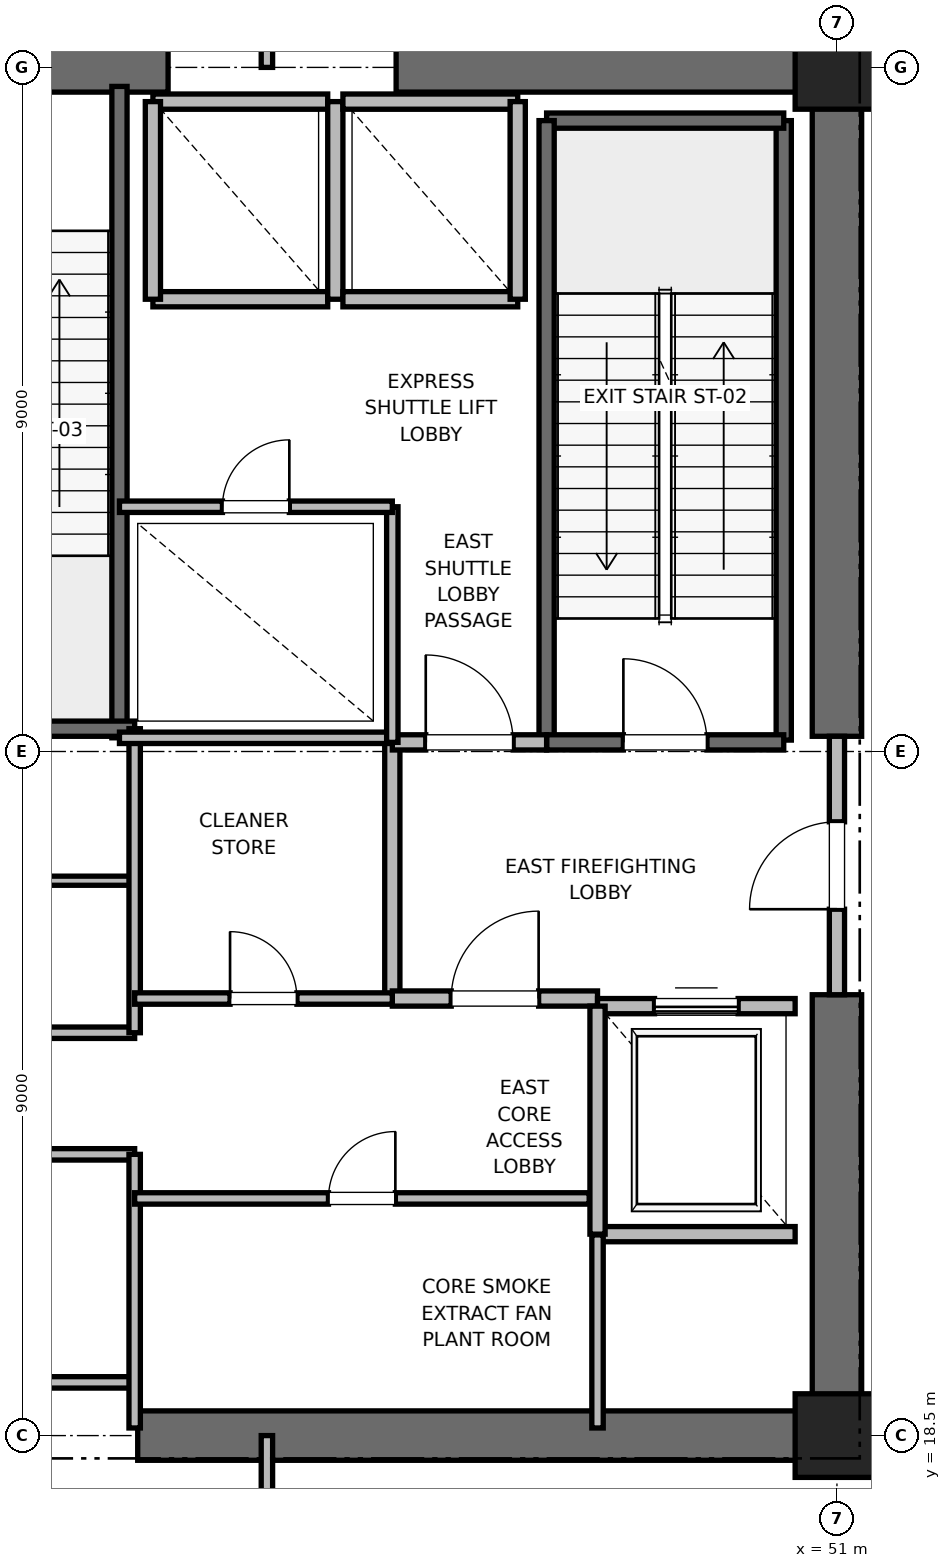
"""IFC4 building model, lengths in metres.
Left out: names, types, materials, properties, quantities, classifications, styles, units other than length and angle.
Written with IfcOpenShell. Run it as: python <this file> out.ifc"""

import sys

from ifc_helpers import new_model, si_unit, direction, frame, frame_2d, origin, origin_2d, place, context, subcontext, project, spatial, rectangle, extrude, element, fill, save


model = new_model("IFC4")
c1 = context("Model", 3, precision=1e-05, world=origin(), true_north=direction((0.0, 1.0)))
c2 = subcontext(c1, "Body", "Model", "MODEL_VIEW")
j1 = project(units=[si_unit("LENGTHUNIT", "METRE"), si_unit("PLANEANGLEUNIT", "RADIAN")], contexts=[c1])
p1 = place(None, origin())
s1 = spatial("IfcSite", under=j1, at=p1, CompositionType="ELEMENT")
p2 = place(p1, origin())
s2 = spatial("IfcBuilding", under=s1, at=p2, CompositionType="ELEMENT")
p3 = place(p2, frame((0.0, 0.0, 107.6)))
s3 = spatial("IfcBuildingStorey", under=s2, at=p3, CompositionType="ELEMENT", Elevation=107.6)
for number, where, z_axis, x_axis in (
    (1, (51.0, 18.5, 0.0), (0.0, 0.0, 1.0), (1.0, 0.0, 0.0)),
    (2, (51.0, 36.5, 0.0), (0.0, 0.0, 1.0), (1.0, 0.0, 0.0)),
):
    element("IfcColumn", number, at=place(p3, frame(where, z_axis=z_axis, x_axis=x_axis)), inside=s3, PredefinedType="PILASTER", context=c2, shape_type="SweptSolid", body=[
        extrude(rectangle(XDim=1.1, YDim=1.1, at=origin_2d()), origin(), (0.0, 0.0, 1.0), 5.4),
    ])
p4 = place(p3, frame((41.8, 18.5, 0.0), z_axis=(0.0, 0.0, 1.0), x_axis=(1.0, 0.0, 0.0)))
e3 = element("IfcWall", 3, at=p4, inside=s3, PredefinedType="SHEAR", context=c2, shape_type="SweptSolid", body=[
    extrude(rectangle(XDim=9.2, YDim=0.65, at=frame_2d((4.6, 0.0))), origin(), (0.0, 0.0, 1.0), 5.1),
])
p5 = place(p3, frame((37.8, 36.5, 0.0), z_axis=(0.0, 0.0, 1.0), x_axis=(1.0, 0.0, 0.0)))
e4 = element("IfcWall", 4, at=p5, inside=s3, PredefinedType="SHEAR", context=c2, shape_type="SweptSolid", body=[
    extrude(rectangle(XDim=4.4, YDim=0.65, at=frame_2d((2.2, 0.0))), origin(), (0.0, 0.0, 1.0), 5.1),
])
p6 = place(p5, frame((1.65, 0.0, 0.0)))
e5 = element("IfcOpeningElement", 5, at=p6, cuts=e4, PredefinedType="OPENING", context=c2, shape_type="SweptSolid", body=[
    extrude(rectangle(XDim=1.1, YDim=2.15, at=frame_2d((0.55, 1.075))), frame((0.0, 0.325, 0.0), z_axis=(0.0, -1.0, 0.0), x_axis=(1.0, 0.0, 0.0)), (0.0, 0.0, 1.0), 0.65),
])
for number, where, z_axis, x_axis in (
    (6, (45.2, 36.5, 0.0), (0.0, 0.0, 1.0), (1.0, 0.0, 0.0)),
    (7, (51.0, 18.5, 0.0), (0.0, 0.0, 1.0), (0.0, 1.0, 0.0)),
):
    element("IfcWall", number, at=place(p3, frame(where, z_axis=z_axis, x_axis=x_axis)), inside=s3, PredefinedType="SHEAR", context=c2, shape_type="SweptSolid", body=[
        extrude(rectangle(XDim=5.8, YDim=0.65, at=frame_2d((2.9, 0.0))), origin(), (0.0, 0.0, 1.0), 5.1),
    ])
p7 = place(p3, frame((51.0, 27.7, 0.0), z_axis=(0.0, 0.0, 1.0), x_axis=(0.0, 1.0, 0.0)))
e8 = element("IfcWall", 8, at=p7, inside=s3, PredefinedType="SHEAR", context=c2, shape_type="SweptSolid", body=[
    extrude(rectangle(XDim=8.8, YDim=0.65, at=frame_2d((4.4, 0.0))), origin(), (0.0, 0.0, 1.0), 5.1),
])
p8 = place(p3, frame((50.3, 27.65, 0.0), z_axis=(0.0, 0.0, 1.0), x_axis=(0.0, 1.0, 0.0)))
e9 = element("IfcWall", 9, at=p8, inside=s3, PredefinedType="SOLIDWALL", context=c2, shape_type="SweptSolid", body=[
    extrude(rectangle(XDim=8.15, YDim=0.2, at=frame_2d((4.075, 0.0))), origin(), (0.0, 0.0, 1.0), 5.1),
])
p9 = place(p3, frame((47.18, 35.8, 0.0), z_axis=(0.0, 0.0, 1.0), x_axis=(1.0, 0.0, 0.0)))
e10 = element("IfcWall", 10, at=p9, inside=s3, PredefinedType="SOLIDWALL", context=c2, shape_type="SweptSolid", body=[
    extrude(rectangle(XDim=3.12, YDim=0.2, at=frame_2d((1.56, 0.0))), origin(), (0.0, 0.0, 1.0), 5.1),
])
p10 = place(p3, frame((47.18, 27.62, 0.0), z_axis=(0.0, 0.0, 1.0), x_axis=(0.0, 1.0, 0.0)))
e11 = element("IfcWall", 11, at=p10, inside=s3, PredefinedType="SOLIDWALL", context=c2, shape_type="SweptSolid", body=[
    extrude(rectangle(XDim=8.18, YDim=0.2, at=frame_2d((4.09, 0.0))), origin(), (0.0, 0.0, 1.0), 5.1),
])
p11 = place(p3, frame((47.18, 27.62, 0.0), z_axis=(0.0, 0.0, 1.0), x_axis=(1.0, 0.0, 0.0)))
e12 = element("IfcWall", 12, at=p11, inside=s3, PredefinedType="SOLIDWALL", context=c2, shape_type="SweptSolid", body=[
    extrude(rectangle(XDim=3.12, YDim=0.2, at=frame_2d((1.56, 0.0))), origin(), (0.0, 0.0, 1.0), 5.1),
])
p12 = place(p11, frame((1.01, 0.0, 0.0)))
e13 = element("IfcOpeningElement", 13, at=p12, cuts=e12, PredefinedType="OPENING", context=c2, shape_type="SweptSolid", body=[
    extrude(rectangle(XDim=1.1, YDim=2.15, at=frame_2d((0.55, 1.075))), frame((0.0, 0.1, 0.0), z_axis=(0.0, -1.0, 0.0), x_axis=(1.0, 0.0, 0.0)), (0.0, 0.0, 1.0), 0.2),
])
p13 = place(p3, frame((41.56, 27.68, 0.0), z_axis=(0.0, 0.0, 1.0), x_axis=(0.0, 1.0, 0.0)))
e14 = element("IfcWall", 14, at=p13, inside=s3, PredefinedType="SOLIDWALL", context=c2, shape_type="SweptSolid", body=[
    extrude(rectangle(XDim=8.57, YDim=0.2, at=frame_2d((4.285, 0.0))), origin(), (0.0, 0.0, 1.0), 5.1),
])
p14 = place(p3, frame((38.44, 27.8, 0.0), z_axis=(0.0, 0.0, 1.0), x_axis=(1.0, 0.0, 0.0)))
e15 = element("IfcWall", 15, at=p14, inside=s3, PredefinedType="SOLIDWALL", context=c2, shape_type="SweptSolid", body=[
    extrude(rectangle(XDim=3.32, YDim=0.2, at=frame_2d((1.66, 0.0))), origin(), (0.0, 0.0, 1.0), 5.1),
])
p15 = place(p3, frame((45.15, 24.25, 0.0), z_axis=(0.0, 0.0, 1.0), x_axis=(0.0, 1.0, 0.0)))
e16 = element("IfcWall", 16, at=p15, inside=s3, PredefinedType="PARTITIONING", context=c2, shape_type="SweptSolid", body=[
    extrude(rectangle(XDim=3.37, YDim=0.2, at=frame_2d((1.685, 0.0))), origin(), (0.0, 0.0, 1.0), 5.1),
])
p16 = place(p3, frame((45.15, 24.25, 0.0), z_axis=(0.0, 0.0, 1.0), x_axis=(1.0, 0.0, 0.0)))
e17 = element("IfcWall", 17, at=p16, inside=s3, PredefinedType="PARTITIONING", context=c2, shape_type="SweptSolid", body=[
    extrude(rectangle(XDim=2.7, YDim=0.2, at=frame_2d((1.35, 0.0))), origin(), (0.0, 0.0, 1.0), 5.1),
])
p17 = place(p16, frame((0.775, 0.0, 0.0)))
e18 = element("IfcOpeningElement", 18, at=p17, cuts=e17, PredefinedType="OPENING", context=c2, shape_type="SweptSolid", body=[
    extrude(rectangle(XDim=1.15, YDim=2.2, at=frame_2d((0.575, 1.1))), frame((0.0, 0.1, 0.0), z_axis=(0.0, -1.0, 0.0), x_axis=(1.0, 0.0, 0.0)), (0.0, 0.0, 1.0), 0.2),
])
p18 = place(p3, frame((45.15, 27.62, 0.0), z_axis=(0.0, 0.0, 1.0), x_axis=(1.0, 0.0, 0.0)))
e19 = element("IfcWall", 19, at=p18, inside=s3, PredefinedType="PARTITIONING", context=c2, shape_type="SweptSolid", body=[
    extrude(rectangle(XDim=2.03, YDim=0.2, at=frame_2d((1.015, 0.0))), origin(), (0.0, 0.0, 1.0), 5.1),
])
p19 = place(p18, frame((0.44, 0.0, 0.0)))
e20 = element("IfcOpeningElement", 20, at=p19, cuts=e19, PredefinedType="OPENING", context=c2, shape_type="SweptSolid", body=[
    extrude(rectangle(XDim=1.15, YDim=2.2, at=frame_2d((0.575, 1.1))), frame((0.0, 0.1, 0.0), z_axis=(0.0, -1.0, 0.0), x_axis=(1.0, 0.0, 0.0)), (0.0, 0.0, 1.0), 0.2),
])
p20 = place(p3, frame((51.0, 24.3, 0.0), z_axis=(0.0, 0.0, 1.0), x_axis=(0.0, 1.0, 0.0)))
e21 = element("IfcWall", 21, at=p20, inside=s3, PredefinedType="PARTITIONING", context=c2, shape_type="SweptSolid", body=[
    extrude(rectangle(XDim=3.4, YDim=0.2, at=frame_2d((1.7, 0.0))), origin(), (0.0, 0.0, 1.0), 3.88),
])
p21 = place(p20, frame((1.125, 0.0, 0.0)))
e22 = element("IfcOpeningElement", 22, at=p21, cuts=e21, PredefinedType="OPENING", context=c2, shape_type="SweptSolid", body=[
    extrude(rectangle(XDim=1.15, YDim=2.2, at=frame_2d((0.575, 1.1))), frame((0.0, 0.1, 0.0), z_axis=(0.0, -1.0, 0.0), x_axis=(1.0, 0.0, 0.0)), (0.0, 0.0, 1.0), 0.2),
])
p22 = place(p3, frame((47.85, 21.15, 0.0), z_axis=(0.0, 0.0, 1.0), x_axis=(1.0, 0.0, 0.0)))
e23 = element("IfcWall", 23, at=p22, inside=s3, PredefinedType="SOLIDWALL", context=c2, shape_type="SweptSolid", body=[
    extrude(rectangle(XDim=2.6, YDim=0.2, at=frame_2d((1.3, 0.0))), origin(), (0.0, 0.0, 1.0), 5.1),
])
p23 = place(p3, frame((50.45, 24.15, 0.0), z_axis=(0.0, 0.0, 1.0), x_axis=(-1.0, 0.0, 0.0)))
e24 = element("IfcWall", 24, at=p23, inside=s3, PredefinedType="SOLIDWALL", context=c2, shape_type="SweptSolid", body=[
    extrude(rectangle(XDim=2.6, YDim=0.2, at=frame_2d((1.3, 0.0))), origin(), (0.0, 0.0, 1.0), 3.88),
])
p24 = place(p23, frame((0.75, 0.0, 0.0)))
e25 = element("IfcOpeningElement", 25, at=p24, cuts=e24, PredefinedType="OPENING", context=c2, shape_type="SweptSolid", body=[
    extrude(rectangle(XDim=1.1, YDim=2.2, at=frame_2d((0.55, 1.1))), frame((0.0, 0.1, 0.0), z_axis=(0.0, -1.0, 0.0), x_axis=(1.0, 0.0, 0.0)), (0.0, 0.0, 1.0), 0.2),
])
p25 = place(p3, frame((47.85, 24.15, 0.0), z_axis=(0.0, 0.0, 1.0), x_axis=(0.0, -1.0, 0.0)))
e26 = element("IfcWall", 26, at=p25, inside=s3, PredefinedType="SOLIDWALL", context=c2, shape_type="SweptSolid", body=[
    extrude(rectangle(XDim=3.0, YDim=0.2, at=frame_2d((1.5, 0.0))), origin(), (0.0, 0.0, 1.0), 5.1),
])
p26 = place(p3, frame((42.0, 33.45, 0.0), z_axis=(0.0, 0.0, 1.0), x_axis=(1.0, 0.0, 0.0)))
e27 = element("IfcWall", 27, at=p26, inside=s3, PredefinedType="SOLIDWALL", context=c2, shape_type="SweptSolid", body=[
    extrude(rectangle(XDim=2.3, YDim=0.2, at=frame_2d((1.15, 0.0))), origin(), (0.0, 0.0, 1.0), 5.1),
])
p27 = place(p3, frame((44.3, 36.05, 0.0), z_axis=(0.0, 0.0, 1.0), x_axis=(-1.0, 0.0, 0.0)))
e28 = element("IfcWall", 28, at=p27, inside=s3, PredefinedType="SOLIDWALL", context=c2, shape_type="SweptSolid", body=[
    extrude(rectangle(XDim=2.3, YDim=0.2, at=frame_2d((1.15, 0.0))), origin(), (0.0, 0.0, 1.0), 3.88),
])
for number, where, z_axis, x_axis in (
    (29, (42.0, 36.05, 0.0), (0.0, 0.0, 1.0), (0.0, -1.0, 0.0)),
    (30, (44.4, 33.45, 0.0), (0.0, 0.0, 1.0), (0.0, 1.0, 0.0)),
):
    element("IfcWall", number, at=place(p3, frame(where, z_axis=z_axis, x_axis=x_axis)), inside=s3, PredefinedType="SOLIDWALL", context=c2, shape_type="SweptSolid", body=[
        extrude(rectangle(XDim=2.6, YDim=0.2, at=frame_2d((1.3, 0.0))), origin(), (0.0, 0.0, 1.0), 3.88),
    ])
p28 = place(p3, frame((44.5, 33.45, 0.0), z_axis=(0.0, 0.0, 1.0), x_axis=(1.0, 0.0, 0.0)))
e31 = element("IfcWall", 31, at=p28, inside=s3, PredefinedType="SOLIDWALL", context=c2, shape_type="SweptSolid", body=[
    extrude(rectangle(XDim=2.3, YDim=0.2, at=frame_2d((1.15, 0.0))), origin(), (0.0, 0.0, 1.0), 5.1),
])
p29 = place(p3, frame((46.8, 36.05, 0.0), z_axis=(0.0, 0.0, 1.0), x_axis=(-1.0, 0.0, 0.0)))
e32 = element("IfcWall", 32, at=p29, inside=s3, PredefinedType="SOLIDWALL", context=c2, shape_type="SweptSolid", body=[
    extrude(rectangle(XDim=2.3, YDim=0.2, at=frame_2d((1.15, 0.0))), origin(), (0.0, 0.0, 1.0), 3.88),
])
p30 = place(p3, frame((46.8, 33.45, 0.0), z_axis=(0.0, 0.0, 1.0), x_axis=(0.0, 1.0, 0.0)))
e33 = element("IfcWall", 33, at=p30, inside=s3, PredefinedType="SOLIDWALL", context=c2, shape_type="SweptSolid", body=[
    extrude(rectangle(XDim=2.6, YDim=0.2, at=frame_2d((1.3, 0.0))), origin(), (0.0, 0.0, 1.0), 5.1),
])
for number, where, z_axis, x_axis in (
    (34, (39.95, 19.2, 0.0), (0.0, 0.0, 1.0), (1.0, 0.0, 0.0)),
    (35, (39.95, 22.2, 0.0), (0.0, 0.0, 1.0), (1.0, 0.0, 0.0)),
    (36, (39.95, 23.8, 0.0), (0.0, 0.0, 1.0), (1.0, 0.0, 0.0)),
):
    element("IfcWall", number, at=place(p3, frame(where, z_axis=z_axis, x_axis=x_axis)), inside=s3, PredefinedType="PARTITIONING", context=c2, shape_type="SweptSolid", body=[
        extrude(rectangle(XDim=1.81, YDim=0.15, at=frame_2d((0.905, 0.0))), origin(), (0.0, 0.0, 1.0), 2.85),
    ])
p31 = place(p3, frame((39.95, 25.8, 0.0), z_axis=(0.0, 0.0, 1.0), x_axis=(1.0, 0.0, 0.0)))
e37 = element("IfcWall", 37, at=p31, inside=s3, PredefinedType="PARTITIONING", context=c2, shape_type="SweptSolid", body=[
    extrude(rectangle(XDim=1.81, YDim=0.12, at=frame_2d((0.905, 0.0))), origin(), (0.0, 0.0, 1.0), 2.85),
])
p32 = place(p3, frame((41.76, 18.6, 0.0), z_axis=(0.0, 0.0, 1.0), x_axis=(0.0, 1.0, 0.0)))
e38 = element("IfcWall", 38, at=p32, inside=s3, PredefinedType="PARTITIONING", context=c2, shape_type="SweptSolid", body=[
    extrude(rectangle(XDim=3.6, YDim=0.15, at=frame_2d((1.8, 0.0))), origin(), (0.0, 0.0, 1.0), 2.85),
])
p33 = place(p3, frame((41.76, 23.8, 0.0), z_axis=(0.0, 0.0, 1.0), x_axis=(0.0, 1.0, 0.0)))
e39 = element("IfcWall", 39, at=p33, inside=s3, PredefinedType="PARTITIONING", context=c2, shape_type="SweptSolid", body=[
    extrude(rectangle(XDim=4.0, YDim=0.15, at=frame_2d((2.0, 0.0))), origin(), (0.0, 0.0, 1.0), 2.85),
])
p34 = place(p3, frame((41.56, 27.68, 0.0), z_axis=(0.0, 0.0, 1.0), x_axis=(1.0, 0.0, 0.0)))
e40 = element("IfcWall", 40, at=p34, inside=s3, PredefinedType="PARTITIONING", context=c2, shape_type="SweptSolid", body=[
    extrude(rectangle(XDim=3.59, YDim=0.15, at=frame_2d((1.795, 0.0))), origin(), (0.0, 0.0, 1.0), 2.85),
])
p35 = place(p3, frame((47.85, 18.6, 0.0), z_axis=(0.0, 0.0, 1.0), x_axis=(0.0, 1.0, 0.0)))
e41 = element("IfcWall", 41, at=p35, inside=s3, PredefinedType="PARTITIONING", context=c2, shape_type="SweptSolid", body=[
    extrude(rectangle(XDim=2.54, YDim=0.15, at=frame_2d((1.27, 0.0))), origin(), (0.0, 0.0, 1.0), 2.85),
])
p36 = place(p3, frame((41.76, 21.62, 0.0), z_axis=(0.0, 0.0, 1.0), x_axis=(1.0, 0.0, 0.0)))
e42 = element("IfcWall", 42, at=p36, inside=s3, PredefinedType="PARTITIONING", context=c2, shape_type="SweptSolid", body=[
    extrude(rectangle(XDim=5.98, YDim=0.15, at=frame_2d((2.99, 0.0))), origin(), (0.0, 0.0, 1.0), 2.85),
])
p37 = place(p36, frame((2.55, 0.0, 0.0)))
e43 = element("IfcOpeningElement", 43, at=p37, cuts=e42, PredefinedType="OPENING", context=c2, shape_type="SweptSolid", body=[
    extrude(rectangle(XDim=0.88, YDim=2.1, at=frame_2d((0.44, 1.05))), frame((0.0, 0.075, 0.0), z_axis=(0.0, -1.0, 0.0), x_axis=(1.0, 0.0, 0.0)), (0.0, 0.0, 1.0), 0.15),
])
p38 = place(p3, frame((41.76, 24.25, 0.0), z_axis=(0.0, 0.0, 1.0), x_axis=(1.0, 0.0, 0.0)))
e44 = element("IfcWall", 44, at=p38, inside=s3, PredefinedType="PARTITIONING", context=c2, shape_type="SweptSolid", body=[
    extrude(rectangle(XDim=3.39, YDim=0.15, at=frame_2d((1.695, 0.0))), origin(), (0.0, 0.0, 1.0), 2.85),
])
p39 = place(p38, frame((1.255, 0.0, 0.0)))
e45 = element("IfcOpeningElement", 45, at=p39, cuts=e44, PredefinedType="OPENING", context=c2, shape_type="SweptSolid", body=[
    extrude(rectangle(XDim=0.88, YDim=2.1, at=frame_2d((0.44, 1.05))), frame((0.0, 0.075, 0.0), z_axis=(0.0, -1.0, 0.0), x_axis=(1.0, 0.0, 0.0)), (0.0, 0.0, 1.0), 0.15),
])
p40 = place(p3, frame((45.15, 27.62, 0.0), z_axis=(0.0, 0.0, 1.0), x_axis=(0.0, 1.0, 0.0)))
e46 = element("IfcWall", 46, at=p40, inside=s3, PredefinedType="PARTITIONING", context=c2, shape_type="SweptSolid", body=[
    extrude(rectangle(XDim=3.1, YDim=0.15, at=frame_2d((1.55, 0.0))), origin(), (0.0, 0.0, 1.0), 2.85),
])
p41 = place(p3, frame((41.56, 30.72, 0.0), z_axis=(0.0, 0.0, 1.0), x_axis=(1.0, 0.0, 0.0)))
e47 = element("IfcWall", 47, at=p41, inside=s3, PredefinedType="PARTITIONING", context=c2, shape_type="SweptSolid", body=[
    extrude(rectangle(XDim=3.59, YDim=0.15, at=frame_2d((1.795, 0.0))), origin(), (0.0, 0.0, 1.0), 2.85),
])
p42 = place(p41, frame((1.355, 0.0, 0.0)))
e48 = element("IfcOpeningElement", 48, at=p42, cuts=e47, PredefinedType="OPENING", context=c2, shape_type="SweptSolid", body=[
    extrude(rectangle(XDim=0.88, YDim=2.1, at=frame_2d((0.44, 1.05))), frame((0.0, 0.075, 0.0), z_axis=(0.0, -1.0, 0.0), x_axis=(1.0, 0.0, 0.0)), (0.0, 0.0, 1.0), 0.15),
])
p43 = place(p3, frame((43.5, 36.5, 0.0), z_axis=(0.0, 0.0, 1.0), x_axis=(0.0, 1.0, 0.0)))
e49 = element("IfcWall", 49, at=p43, inside=s3, PredefinedType="PARTITIONING", context=c2, shape_type="SweptSolid", body=[
    extrude(rectangle(XDim=2.7, YDim=0.15, at=frame_2d((1.35, 0.0))), origin(), (0.0, 0.0, 1.0), 2.85),
])
p44 = place(p43, frame((0.875, 0.0, 0.0)))
e50 = element("IfcOpeningElement", 50, at=p44, cuts=e49, PredefinedType="OPENING", context=c2, shape_type="SweptSolid", body=[
    extrude(rectangle(XDim=0.95, YDim=2.15, at=frame_2d((0.475, 1.075))), frame((0.0, 0.075, 0.0), z_axis=(0.0, -1.0, 0.0), x_axis=(1.0, 0.0, 0.0)), (0.0, 0.0, 1.0), 0.15),
])
p45 = place(p3, frame((43.5, 15.8, 0.0), z_axis=(0.0, 0.0, 1.0), x_axis=(0.0, 1.0, 0.0)))
e51 = element("IfcWall", 51, at=p45, inside=s3, PredefinedType="PARTITIONING", context=c2, shape_type="SweptSolid", body=[
    extrude(rectangle(XDim=2.7, YDim=0.15, at=frame_2d((1.35, 0.0))), origin(), (0.0, 0.0, 1.0), 2.85),
])
p46 = place(p45, frame((0.875, 0.0, 0.0)))
e52 = element("IfcOpeningElement", 52, at=p46, cuts=e51, PredefinedType="OPENING", context=c2, shape_type="SweptSolid", body=[
    extrude(rectangle(XDim=0.95, YDim=2.15, at=frame_2d((0.475, 1.075))), frame((0.0, 0.075, 0.0), z_axis=(0.0, -1.0, 0.0), x_axis=(1.0, 0.0, 0.0)), (0.0, 0.0, 1.0), 0.15),
])
p47 = place(p12, origin())
e53 = element("IfcDoor", 53, at=p47, inside=s3, OperationType="SINGLE_SWING_LEFT", PredefinedType="DOOR", context=c2, shape_type="SweptSolid", body=[
    extrude(rectangle(XDim=1.1, YDim=2.15, at=frame_2d((0.55, 1.075))), frame((0.0, 0.025, 0.0), z_axis=(0.0, -1.0, 0.0), x_axis=(1.0, 0.0, 0.0)), (0.0, 0.0, 1.0), 0.05),
])
fill(e13, e53)
p48 = place(p17, origin())
e54 = element("IfcDoor", 54, at=p48, inside=s3, OperationType="SINGLE_SWING_RIGHT", PredefinedType="DOOR", context=c2, shape_type="SweptSolid", body=[
    extrude(rectangle(XDim=1.15, YDim=2.2, at=frame_2d((0.575, 1.1))), frame((0.0, 0.025, 0.0), z_axis=(0.0, -1.0, 0.0), x_axis=(1.0, 0.0, 0.0)), (0.0, 0.0, 1.0), 0.05),
])
fill(e18, e54)
p49 = place(p19, origin())
e55 = element("IfcDoor", 55, at=p49, inside=s3, OperationType="SINGLE_SWING_LEFT", PredefinedType="DOOR", context=c2, shape_type="SweptSolid", body=[
    extrude(rectangle(XDim=1.15, YDim=2.2, at=frame_2d((0.575, 1.1))), frame((0.0, 0.025, 0.0), z_axis=(0.0, -1.0, 0.0), x_axis=(1.0, 0.0, 0.0)), (0.0, 0.0, 1.0), 0.05),
])
fill(e20, e55)
p50 = place(p21, origin())
e56 = element("IfcDoor", 56, at=p50, inside=s3, OperationType="SINGLE_SWING_LEFT", PredefinedType="DOOR", context=c2, shape_type="SweptSolid", body=[
    extrude(rectangle(XDim=1.15, YDim=2.2, at=frame_2d((0.575, 1.1))), frame((0.0, 0.025, 0.0), z_axis=(0.0, -1.0, 0.0), x_axis=(1.0, 0.0, 0.0)), (0.0, 0.0, 1.0), 0.05),
])
fill(e22, e56)
p51 = place(p24, origin())
e57 = element("IfcDoor", 57, at=p51, inside=s3, OperationType="SLIDING_TO_RIGHT", PredefinedType="DOOR", context=c2, shape_type="SweptSolid", body=[
    extrude(rectangle(XDim=1.1, YDim=2.2, at=frame_2d((0.55, 1.1))), frame((0.0, 0.025, 0.0), z_axis=(0.0, -1.0, 0.0), x_axis=(1.0, 0.0, 0.0)), (0.0, 0.0, 1.0), 0.05),
])
fill(e25, e57)
p52 = place(p37, origin())
e58 = element("IfcDoor", 58, at=p52, inside=s3, OperationType="SINGLE_SWING_RIGHT", PredefinedType="DOOR", context=c2, shape_type="SweptSolid", body=[
    extrude(rectangle(XDim=0.88, YDim=2.1, at=frame_2d((0.44, 1.05))), frame((0.0, 0.025, 0.0), z_axis=(0.0, -1.0, 0.0), x_axis=(1.0, 0.0, 0.0)), (0.0, 0.0, 1.0), 0.05),
])
fill(e43, e58)
p53 = place(p39, origin())
e59 = element("IfcDoor", 59, at=p53, inside=s3, OperationType="SINGLE_SWING_LEFT", PredefinedType="DOOR", context=c2, shape_type="SweptSolid", body=[
    extrude(rectangle(XDim=0.88, YDim=2.1, at=frame_2d((0.44, 1.05))), frame((0.0, 0.025, 0.0), z_axis=(0.0, -1.0, 0.0), x_axis=(1.0, 0.0, 0.0)), (0.0, 0.0, 1.0), 0.05),
])
fill(e45, e59)
p54 = place(p42, origin())
e60 = element("IfcDoor", 60, at=p54, inside=s3, OperationType="SINGLE_SWING_RIGHT", PredefinedType="DOOR", context=c2, shape_type="SweptSolid", body=[
    extrude(rectangle(XDim=0.88, YDim=2.1, at=frame_2d((0.44, 1.05))), frame((0.0, 0.025, 0.0), z_axis=(0.0, -1.0, 0.0), x_axis=(1.0, 0.0, 0.0)), (0.0, 0.0, 1.0), 0.05),
])
fill(e48, e60)
save(model, sys.argv[1])
